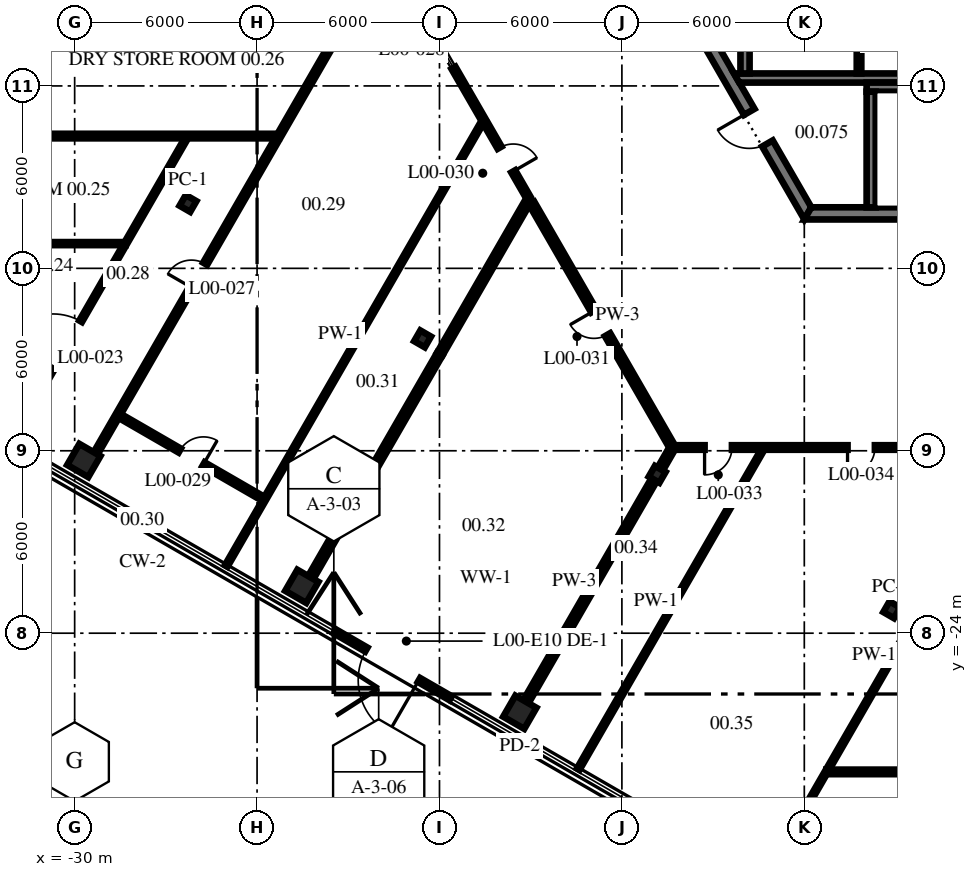
"""IFC4 building model, lengths in metres.
Left out: names, types, materials, properties, quantities, classifications, styles, units other than length and angle.
Written with IfcOpenShell. Run it as: python <this file> out.ifc"""

import sys

from ifc_helpers import new_model, si_unit, direction, frame, frame_2d, origin, origin_2d, place, context, subcontext, project, spatial, polyline, rectangle, i_section, outline, extrude, source, transform, mapped, element, fill, save


model = new_model("IFC4")
c1 = context("Model", 3, precision=1e-05, world=origin(), true_north=direction((0.0, 1.0)))
c2 = subcontext(c1, "Body", "Model", "MODEL_VIEW")
j1 = project(units=[si_unit("LENGTHUNIT", "METRE"), si_unit("PLANEANGLEUNIT", "RADIAN")], contexts=[c1])
p1 = place(None, origin())
s1 = spatial("IfcSite", under=j1, at=p1, CompositionType="ELEMENT")
p2 = place(p1, origin())
s2 = spatial("IfcBuilding", under=s1, at=p2, CompositionType="ELEMENT")
p3 = place(p2, origin())
s3 = spatial("IfcBuildingStorey", under=s2, at=p3, CompositionType="ELEMENT", Elevation=0.0)
m1 = source(origin(), c2, "Body", "SweptSolid", [
    extrude(i_section(OverallWidth=0.404, OverallDepth=0.406, WebThickness=0.027, FlangeThickness=0.044, at=origin_2d()), origin(), (0.0, 0.0, 1.0), 7.2),
])
for number, where, z_axis, x_axis in (
    (1, (-26.272, -9.865, -0.2), (0.0, 0.0, 1.0), (0.866, -0.5, 0.0)),
    (2, (-18.556, -14.32, -0.2), (0.0, 0.0, 1.0), (0.866, -0.5, 0.0)),
    (3, (-10.84, -18.775, -0.2), (0.0, 0.0, 1.0), (0.866, -0.5, 0.0)),
    (4, (-3.124, -23.23, -0.2), (0.0, 0.0, 1.0), (0.866, -0.5, 0.0)),
):
    element("IfcColumn", number, at=place(p3, frame(where, z_axis=z_axis, x_axis=x_axis)), inside=s3, PredefinedType="COLUMN", context=c2, shape_type="MappedRepresentation", body=[
        mapped(m1, transform((0.0, 0.0, 0.0), scale=1.0)),
    ])
m2 = source(origin(), c2, "Body", "SweptSolid", [
    extrude(rectangle(XDim=0.8, YDim=0.8, at=origin_2d()), origin(), (0.0, 0.0, 1.0), 7.2),
])
for number, where, z_axis, x_axis in (
    (5, (-29.699, -18.32, -0.2), (0.0, 0.0, 1.0), (0.866, -0.5, 0.0)),
    (6, (-22.528, -22.46, -0.2), (0.0, 0.0, 1.0), (0.866, -0.5, 0.0)),
    (7, (-15.358, -26.6, -0.2), (0.0, 0.0, 1.0), (0.866, -0.5, 0.0)),
):
    element("IfcColumn", number, at=place(p3, frame(where, z_axis=z_axis, x_axis=x_axis)), inside=s3, PredefinedType="COLUMN", context=c2, shape_type="MappedRepresentation", body=[
        mapped(m2, transform((0.0, 0.0, 0.0), scale=1.0)),
    ])
m3 = source(origin(), c2, "Body", "SweptSolid", [
    extrude(outline(polyline([(-0.115, -0.2), (11.885, -0.2), (11.654, 0.2), (0.115, 0.2), (-0.115, -0.2)])), origin(), (0.0, 0.0, 1.0), 7.0),
])
p4 = place(p3, frame((-11.769, 0.0, -0.2), z_axis=(0.0, 0.0, 1.0), x_axis=(0.499996592174, -0.866027371285, 0.0)))
e8 = element("IfcWall", 8, at=p4, inside=s3, PredefinedType="SHEAR", context=c2, shape_type="MappedRepresentation", body=[
    mapped(m3, transform((0.0, 0.0, 0.0), scale=1.0)),
])
p5 = place(p4, frame((1.405, 0.0, 0.2)))
e9 = element("IfcOpeningElement", 9, at=p5, cuts=e8, PredefinedType="OPENING", context=c2, shape_type="SweptSolid", body=[
    extrude(rectangle(XDim=1.8, YDim=2.1, at=frame_2d((0.9, 1.05))), frame((0.0, 0.21, 0.0), z_axis=(0.0, -1.0, 0.0), x_axis=(1.0, 0.0, 0.0)), (0.0, 0.0, 1.0), 0.42),
])
p6 = place(p4, frame((7.915, 0.0, 0.2)))
e10 = element("IfcOpeningElement", 10, at=p6, cuts=e8, PredefinedType="OPENING", context=c2, shape_type="SweptSolid", body=[
    extrude(rectangle(XDim=1.2, YDim=2.1, at=frame_2d((0.6, 1.05))), frame((0.0, 0.21, 0.0), z_axis=(0.0, -1.0, 0.0), x_axis=(1.0, 0.0, 0.0)), (0.0, 0.0, 1.0), 0.42),
])
p7 = place(p3, frame((-5.885, -10.192, -0.2), z_axis=(0.0, 0.0, 1.0), x_axis=(1.0, 0.0, 0.0)))
e11 = element("IfcWall", 11, at=p7, inside=s3, PredefinedType="SHEAR", context=c2, shape_type="MappedRepresentation", body=[
    mapped(m3, transform((0.0, 0.0, 0.0), scale=1.0)),
])
p8 = place(p7, frame((7.985, 0.0, 0.2)))
e12 = element("IfcOpeningElement", 12, at=p8, cuts=e11, PredefinedType="OPENING", context=c2, shape_type="SweptSolid", body=[
    extrude(rectangle(XDim=1.2, YDim=2.1, at=frame_2d((0.6, 1.05))), frame((0.0, 0.21, 0.0), z_axis=(0.0, -1.0, 0.0), x_axis=(1.0, 0.0, 0.0)), (0.0, 0.0, 1.0), 0.42),
])
p9 = place(p3, frame((-8.1, -5.74, -0.2), z_axis=(0.0, 0.0, 1.0), x_axis=(1.0, 0.0, 0.0)))
e13 = element("IfcWall", 13, at=p9, inside=s3, PredefinedType="SHEAR", context=c2, shape_type="SweptSolid", body=[
    extrude(outline(polyline([(12.0, -0.15), (-0.04, -0.15), (-0.213, 0.15), (12.0, 0.15), (12.0, -0.15)])), origin(), (0.0, 0.0, 1.0), 7.0),
])
m4 = source(origin(), c2, "Body", "SweptSolid", [
    extrude(rectangle(XDim=2.2, YDim=0.3, at=frame_2d((1.1, 0.0))), origin(), (0.0, 0.0, 1.0), 7.0),
])
p10 = place(p3, frame((-7.95, -5.59, -0.2), z_axis=(0.0, 0.0, 1.0), x_axis=(0.0, 1.0, 0.0)))
e14 = element("IfcWall", 14, at=p10, inside=s3, PredefinedType="SHEAR", context=c2, shape_type="MappedRepresentation", body=[
    mapped(m4, transform((0.0, 0.0, 0.0), scale=1.0)),
])
p11 = place(p3, frame((-3.95, -6.04, -0.2), z_axis=(0.0, 0.0, 1.0), x_axis=(1.0, 0.0, 0.0)))
e15 = element("IfcWall", 15, at=p11, inside=s3, PredefinedType="SHEAR", context=c2, shape_type="SweptSolid", body=[
    extrude(outline(polyline([(0.0, -0.15), (8.95, -0.15), (8.65, 0.15), (0.0, 0.15), (0.0, -0.15)])), origin(), (0.0, 0.0, 1.0), 7.0),
])
m5 = source(origin(), c2, "Body", "SweptSolid", [
    extrude(outline(polyline([(3.8, -0.15), (-0.004, -0.15), (-0.004, 0.15), (3.8, 0.15), (3.8, -0.15)])), origin(), (0.0, 0.0, 1.0), 7.0),
])
p12 = place(p3, frame((-3.8, -9.99, -0.2), z_axis=(0.0, 0.0, 1.0), x_axis=(0.0, 1.0, 0.0)))
e16 = element("IfcWall", 16, at=p12, inside=s3, PredefinedType="SHEAR", context=c2, shape_type="MappedRepresentation", body=[
    mapped(m5, transform((0.0, 0.0, 0.0), scale=1.0)),
])
m6 = source(origin(), c2, "Body", "SweptSolid", [
    extrude(rectangle(XDim=2.2, YDim=0.15, at=frame_2d((1.1, 0.0))), origin(), (0.0, 0.0, 1.0), 6.8),
])
p13 = place(p3, frame((-4.2, -5.59, 0.0), z_axis=(0.0, 0.0, 1.0), x_axis=(0.0, 1.0, 0.0)))
e17 = element("IfcWall", 17, at=p13, inside=s3, PredefinedType="PARTITIONING", context=c2, shape_type="MappedRepresentation", body=[
    mapped(m6, transform((0.0, 0.0, 0.0), scale=1.0)),
])
m7 = source(origin(), c2, "Body", "SweptSolid", [
    extrude(rectangle(XDim=4.403, YDim=0.15, at=frame_2d((2.201, 0.0))), origin(), (0.0, 0.0, 1.0), 6.8),
])
p14 = place(p3, frame((-17.634, -26.139, 0.0), z_axis=(0.0, 0.0, 1.0), x_axis=(-0.866026760492, 0.499997650106, 0.0)))
e18 = element("IfcWall", 18, at=p14, inside=s3, PredefinedType="ELEMENTEDWALL", context=c2, shape_type="MappedRepresentation", body=[
    mapped(m7, transform((0.0, 0.0, 0.0), scale=1.0)),
])
p15 = place(p14, frame((1.201, 0.0, 0.0)))
e19 = element("IfcOpeningElement", 19, at=p15, cuts=e18, PredefinedType="OPENING", context=c2, shape_type="SweptSolid", body=[
    extrude(rectangle(XDim=2.0, YDim=2.7, at=frame_2d((1.0, 1.35))), frame((0.0, 0.085, 0.0), z_axis=(0.0, -1.0, 0.0), x_axis=(1.0, 0.0, 0.0)), (0.0, 0.0, 1.0), 0.17),
])
p16 = place(p3, frame((-20.635, -0.043, 0.0), z_axis=(0.0, 0.0, 1.0), x_axis=(0.500007080889, -0.866021315593, 0.0)))
e20 = element("IfcWall", 20, at=p16, inside=s3, PredefinedType="PARTITIONING", context=c2, shape_type="SweptSolid", body=[
    extrude(rectangle(XDim=11.113, YDim=0.15, at=frame_2d((5.556, 0.0))), origin(), (0.0, 0.0, 1.0), 6.8),
])
p17 = place(p16, frame((0.4, 0.0, 0.0)))
e21 = element("IfcOpeningElement", 21, at=p17, cuts=e20, PredefinedType="OPENING", context=c2, shape_type="SweptSolid", body=[
    extrude(rectangle(XDim=0.9, YDim=2.1, at=frame_2d((0.45, 1.05))), frame((0.0, 0.085, 0.0), z_axis=(0.0, -1.0, 0.0), x_axis=(1.0, 0.0, 0.0)), (0.0, 0.0, 1.0), 0.17),
])
p18 = place(p16, frame((3.792, 0.0, 0.0)))
e22 = element("IfcOpeningElement", 22, at=p18, cuts=e20, PredefinedType="OPENING", context=c2, shape_type="SweptSolid", body=[
    extrude(rectangle(XDim=2.4, YDim=2.4, at=frame_2d((1.2, 1.2))), frame((0.0, 0.085, 0.0), z_axis=(0.0, -1.0, 0.0), x_axis=(1.0, 0.0, 0.0)), (0.0, 0.0, 1.0), 0.17),
])
p19 = place(p16, frame((9.224, 0.0, 0.0)))
e23 = element("IfcOpeningElement", 23, at=p19, cuts=e20, PredefinedType="OPENING", context=c2, shape_type="SweptSolid", body=[
    extrude(rectangle(XDim=0.9, YDim=2.1, at=frame_2d((0.45, 1.05))), frame((0.0, 0.085, 0.0), z_axis=(0.0, -1.0, 0.0), x_axis=(1.0, 0.0, 0.0)), (0.0, 0.0, 1.0), 0.17),
])
p20 = place(p3, frame((-14.969, -9.858, 0.0), z_axis=(0.0, 0.0, 1.0), x_axis=(0.500003393015, -0.866023444818, 0.0)))
e24 = element("IfcWall", 24, at=p20, inside=s3, PredefinedType="PARTITIONING", context=c2, shape_type="SweptSolid", body=[
    extrude(rectangle(XDim=9.228, YDim=0.2, at=frame_2d((4.614, 0.0))), origin(), (0.0, 0.0, 1.0), 6.8),
])
p21 = place(p20, frame((4.094, 0.0, 0.0)))
e25 = element("IfcOpeningElement", 25, at=p21, cuts=e24, PredefinedType="OPENING", context=c2, shape_type="SweptSolid", body=[
    extrude(rectangle(XDim=0.9, YDim=2.1, at=frame_2d((0.45, 1.05))), frame((0.0, 0.11, 0.0), z_axis=(0.0, -1.0, 0.0), x_axis=(1.0, 0.0, 0.0)), (0.0, 0.0, 1.0), 0.22),
])
p22 = place(p3, frame((-28.526, -16.848, 0.0), z_axis=(0.0, 0.0, 1.0), x_axis=(0.866016423889, -0.500015553313, 0.0)))
e26 = element("IfcWall", 26, at=p22, inside=s3, PredefinedType="PARTITIONING", context=c2, shape_type="SweptSolid", body=[
    extrude(rectangle(XDim=5.48, YDim=0.15, at=frame_2d((2.74, 0.0))), origin(), (0.0, 0.0, 1.0), 6.8),
])
p23 = place(p22, frame((2.29, 0.0, 0.0)))
e27 = element("IfcOpeningElement", 27, at=p23, cuts=e26, PredefinedType="OPENING", context=c2, shape_type="SweptSolid", body=[
    extrude(rectangle(XDim=0.9, YDim=2.1, at=frame_2d((0.45, 1.05))), frame((0.0, 0.085, 0.0), z_axis=(0.0, -1.0, 0.0), x_axis=(1.0, 0.0, 0.0)), (0.0, 0.0, 1.0), 0.17),
])
p24 = place(p3, frame((-5.276, -28.562, 0.0), z_axis=(0.0, 0.0, 1.0), x_axis=(1.0, 0.0, 0.0)))
e28 = element("IfcWall", 28, at=p24, inside=s3, PredefinedType="PARTITIONING", context=c2, shape_type="SweptSolid", body=[
    extrude(rectangle(XDim=17.087, YDim=0.15, at=frame_2d((8.544, 0.0))), origin(), (0.0, 0.0, 1.0), 6.8),
])
p25 = place(p24, frame((12.212, 0.0, 0.0)))
e29 = element("IfcOpeningElement", 29, at=p25, cuts=e28, PredefinedType="OPENING", context=c2, shape_type="SweptSolid", body=[
    extrude(rectangle(XDim=1.8, YDim=2.4, at=frame_2d((0.9, 1.2))), frame((0.0, 0.085, 0.0), z_axis=(0.0, -1.0, 0.0), x_axis=(1.0, 0.0, 0.0)), (0.0, 0.0, 1.0), 0.17),
])
p26 = place(p24, frame((4.05, 0.0, 0.0)))
e30 = element("IfcOpeningElement", 30, at=p26, cuts=e28, PredefinedType="OPENING", context=c2, shape_type="SweptSolid", body=[
    extrude(rectangle(XDim=0.9, YDim=2.1, at=frame_2d((0.45, 1.05))), frame((0.0, 0.085, 0.0), z_axis=(0.0, -1.0, 0.0), x_axis=(1.0, 0.0, 0.0)), (0.0, 0.0, 1.0), 0.17),
])
p27 = place(p3, frame((-10.33, -17.892, 0.0), z_axis=(0.0, 0.0, 1.0), x_axis=(1.0, 0.0, 0.0)))
e31 = element("IfcWall", 31, at=p27, inside=s3, PredefinedType="PARTITIONING", context=c2, shape_type="SweptSolid", body=[
    extrude(rectangle(XDim=20.618, YDim=0.15, at=frame_2d((10.309, 0.0))), origin(), (0.0, 0.0, 1.0), 6.8),
])
p28 = place(p27, frame((1.05, 0.0, 0.0)))
e32 = element("IfcOpeningElement", 32, at=p28, cuts=e31, PredefinedType="OPENING", context=c2, shape_type="SweptSolid", body=[
    extrude(rectangle(XDim=0.9, YDim=2.1, at=frame_2d((0.45, 1.05))), frame((0.0, 0.085, 0.0), z_axis=(0.0, -1.0, 0.0), x_axis=(1.0, 0.0, 0.0)), (0.0, 0.0, 1.0), 0.17),
])
p29 = place(p27, frame((5.752, 0.0, 0.0)))
e33 = element("IfcOpeningElement", 33, at=p29, cuts=e31, PredefinedType="OPENING", context=c2, shape_type="SweptSolid", body=[
    extrude(rectangle(XDim=0.9, YDim=2.1, at=frame_2d((0.45, 1.05))), frame((0.0, 0.085, 0.0), z_axis=(0.0, -1.0, 0.0), x_axis=(1.0, 0.0, 0.0)), (0.0, 0.0, 1.0), 0.17),
])
p30 = place(p27, frame((14.564, 0.0, 0.0)))
e34 = element("IfcOpeningElement", 34, at=p30, cuts=e31, PredefinedType="OPENING", context=c2, shape_type="SweptSolid", body=[
    extrude(rectangle(XDim=0.9, YDim=2.1, at=frame_2d((0.45, 1.05))), frame((0.0, 0.085, 0.0), z_axis=(0.0, -1.0, 0.0), x_axis=(1.0, 0.0, 0.0)), (0.0, 0.0, 1.0), 0.17),
])
p31 = place(p3, frame((-43.433, -11.186, 0.0), z_axis=(0.0, 0.0, 1.0), x_axis=(1.0, 0.0, 0.0)))
e35 = element("IfcWall", 35, at=p31, inside=s3, PredefinedType="PARTITIONING", context=c2, shape_type="SweptSolid", body=[
    extrude(rectangle(XDim=15.104, YDim=0.1, at=frame_2d((7.552, 0.0))), origin(), (0.0, 0.0, 1.0), 6.8),
])
p32 = place(p3, frame((-49.56, -7.649, 0.0), z_axis=(0.0, 0.0, 1.0), x_axis=(1.0, 0.0, 0.0)))
e36 = element("IfcWall", 36, at=p32, inside=s3, PredefinedType="PARTITIONING", context=c2, shape_type="SweptSolid", body=[
    extrude(rectangle(XDim=26.276, YDim=0.15, at=frame_2d((13.138, 0.0))), origin(), (0.0, 0.0, 1.0), 6.8),
])
p33 = place(p32, frame((11.15, 0.0, 0.0)))
e37 = element("IfcOpeningElement", 37, at=p33, cuts=e36, PredefinedType="OPENING", context=c2, shape_type="SweptSolid", body=[
    extrude(rectangle(XDim=0.9, YDim=2.1, at=frame_2d((0.45, 1.05))), frame((0.0, 0.085, 0.0), z_axis=(0.0, -1.0, 0.0), x_axis=(1.0, 0.0, 0.0)), (0.0, 0.0, 1.0), 0.17),
])
p34 = place(p3, frame((-7.279, -32.031, 0.0), z_axis=(0.0, 0.0, 1.0), x_axis=(0.499989721496, 0.866031338, 0.0)))
e38 = element("IfcWall", 38, at=p34, inside=s3, PredefinedType="PARTITIONING", context=c2, shape_type="SweptSolid", body=[
    extrude(rectangle(XDim=16.236, YDim=0.1, at=frame_2d((8.118, 0.0))), origin(), (0.0, 0.0, 1.0), 6.8),
])
p35 = place(p3, frame((-13.438, -28.475, 0.0), z_axis=(0.0, 0.0, 1.0), x_axis=(0.50000294753, 0.86602370202, 0.0)))
e39 = element("IfcWall", 39, at=p35, inside=s3, PredefinedType="PARTITIONING", context=c2, shape_type="SweptSolid", body=[
    extrude(rectangle(XDim=12.13, YDim=0.1, at=frame_2d((6.065, 0.0))), origin(), (0.0, 0.0, 1.0), 6.8),
])
p36 = place(p3, frame((-15.162, -26.263, 0.0), z_axis=(0.0, 0.0, 1.0), x_axis=(0.499984984754, 0.866034072667, 0.0)))
e40 = element("IfcWall", 40, at=p36, inside=s3, PredefinedType="PARTITIONING", context=c2, shape_type="SweptSolid", body=[
    extrude(rectangle(XDim=8.452, YDim=0.2, at=frame_2d((4.226, 0.0))), origin(), (0.0, 0.0, 1.0), 6.028),
])
p37 = place(p3, frame((-10.743, -18.608, 0.0), z_axis=(0.0, 0.0, 1.0), x_axis=(0.500080938595, 0.865978668822, 0.0)))
e41 = element("IfcWall", 41, at=p37, inside=s3, PredefinedType="PARTITIONING", context=c2, shape_type="SweptSolid", body=[
    extrude(rectangle(XDim=0.786, YDim=0.2, at=frame_2d((0.393, 0.0))), origin(), (0.0, 0.0, 1.0), 6.188),
])
p38 = place(p3, frame((-22.238, -22.177, 0.0), z_axis=(0.0, 0.0, 1.0), x_axis=(0.500007862672, 0.866020864221, 0.0)))
e42 = element("IfcWall", 42, at=p38, inside=s3, PredefinedType="PARTITIONING", context=c2, shape_type="SweptSolid", body=[
    extrude(rectangle(XDim=8.49, YDim=0.2, at=frame_2d((4.245, 0.0))), origin(), (0.0, 0.0, 1.0), 6.028),
])
p39 = place(p3, frame((-17.993, -14.824, 0.0), z_axis=(0.0, 0.0, 1.0), x_axis=(0.500003463284, 0.866023404247, 0.0)))
e43 = element("IfcWall", 43, at=p39, inside=s3, PredefinedType="PARTITIONING", context=c2, shape_type="SweptSolid", body=[
    extrude(rectangle(XDim=5.891, YDim=0.2, at=frame_2d((2.946, 0.0))), origin(), (0.0, 0.0, 1.0), 6.8),
])
p40 = place(p3, frame((-25.017, -21.79, 0.0), z_axis=(0.0, 0.0, 1.0), x_axis=(0.499997792702, 0.866026678165, 0.0)))
e44 = element("IfcWall", 44, at=p40, inside=s3, PredefinedType="PARTITIONING", context=c2, shape_type="SweptSolid", body=[
    extrude(rectangle(XDim=16.937, YDim=0.1, at=frame_2d((8.469, 0.0))), origin(), (0.0, 0.0, 1.0), 6.8),
])
p41 = place(p3, frame((-29.313, -18.092, 0.0), z_axis=(0.0, 0.0, 1.0), x_axis=(0.499996874182, 0.866027208469, 0.0)))
e45 = element("IfcWall", 45, at=p41, inside=s3, PredefinedType="PARTITIONING", context=c2, shape_type="SweptSolid", body=[
    extrude(rectangle(XDim=19.099, YDim=0.15, at=frame_2d((9.549, 0.0))), origin(), (0.0, 0.0, 1.0), 6.8),
])
p42 = place(p41, frame((6.309, 0.0, 0.0)))
e46 = element("IfcOpeningElement", 46, at=p42, cuts=e45, PredefinedType="OPENING", context=c2, shape_type="SweptSolid", body=[
    extrude(rectangle(XDim=0.9, YDim=2.1, at=frame_2d((0.45, 1.05))), frame((0.0, 0.085, 0.0), z_axis=(0.0, -1.0, 0.0), x_axis=(1.0, 0.0, 0.0)), (0.0, 0.0, 1.0), 0.17),
])
p43 = place(p3, frame((-32.092, -17.705, 0.0), z_axis=(0.0, 0.0, 1.0), x_axis=(0.499985969581, 0.866033504099, 0.0)))
e47 = element("IfcWall", 47, at=p43, inside=s3, PredefinedType="PARTITIONING", context=c2, shape_type="SweptSolid", body=[
    extrude(rectangle(XDim=11.522, YDim=0.1, at=frame_2d((5.761, 0.0))), origin(), (0.0, 0.0, 1.0), 6.8),
])
p44 = place(p43, frame((2.777, 0.0, 0.0)))
e48 = element("IfcOpeningElement", 48, at=p44, cuts=e47, PredefinedType="OPENING", context=c2, shape_type="SweptSolid", body=[
    extrude(rectangle(XDim=1.8, YDim=2.4, at=frame_2d((0.9, 1.2))), frame((0.0, 0.06, 0.0), z_axis=(0.0, -1.0, 0.0), x_axis=(1.0, 0.0, 0.0)), (0.0, 0.0, 1.0), 0.12),
])
p45 = place(p6, frame((1.2, 0.0, 0.0), z_axis=(0.0, 0.0, 1.0), x_axis=(-1.0, 0.0, 0.0)))
e49 = element("IfcDoor", 49, at=p45, inside=s3, OperationType="SINGLE_SWING_RIGHT", PredefinedType="DOOR", context=c2, shape_type="SweptSolid", body=[
    extrude(rectangle(XDim=1.2, YDim=2.1, at=frame_2d((0.6, 1.05))), frame((0.0, 0.025, 0.0), z_axis=(0.0, -1.0, 0.0), x_axis=(1.0, 0.0, 0.0)), (0.0, 0.0, 1.0), 0.05),
])
fill(e10, e49)
p46 = place(p15, origin())
e50 = element("IfcDoor", 50, at=p46, inside=s3, OperationType="DOUBLE_DOOR_SINGLE_SWING", PredefinedType="DOOR", context=c2, shape_type="SweptSolid", body=[
    extrude(rectangle(XDim=2.0, YDim=2.7, at=frame_2d((1.0, 1.35))), frame((0.0, 0.025, 0.0), z_axis=(0.0, -1.0, 0.0), x_axis=(1.0, 0.0, 0.0)), (0.0, 0.0, 1.0), 0.05),
])
fill(e19, e50)
p47 = place(p44, origin())
e51 = element("IfcDoor", 51, at=p47, inside=s3, OperationType="DOUBLE_DOOR_SINGLE_SWING", PredefinedType="DOOR", context=c2, shape_type="SweptSolid", body=[
    extrude(rectangle(XDim=1.8, YDim=2.4, at=frame_2d((0.9, 1.2))), frame((0.0, 0.025, 0.0), z_axis=(0.0, -1.0, 0.0), x_axis=(1.0, 0.0, 0.0)), (0.0, 0.0, 1.0), 0.05),
])
fill(e48, e51)
p48 = place(p42, origin())
e52 = element("IfcDoor", 52, at=p48, inside=s3, OperationType="SINGLE_SWING_LEFT", PredefinedType="DOOR", context=c2, shape_type="SweptSolid", body=[
    extrude(rectangle(XDim=0.9, YDim=2.1, at=frame_2d((0.45, 1.05))), frame((0.0, 0.025, 0.0), z_axis=(0.0, -1.0, 0.0), x_axis=(1.0, 0.0, 0.0)), (0.0, 0.0, 1.0), 0.05),
])
fill(e46, e52)
p49 = place(p18, origin())
e53 = element("IfcDoor", 53, at=p49, inside=s3, OperationType="ROLLINGUP", PredefinedType="DOOR", context=c2, shape_type="SweptSolid", body=[
    extrude(rectangle(XDim=2.4, YDim=2.4, at=frame_2d((1.2, 1.2))), frame((0.0, 0.025, 0.0), z_axis=(0.0, -1.0, 0.0), x_axis=(1.0, 0.0, 0.0)), (0.0, 0.0, 1.0), 0.05),
])
fill(e22, e53)
p50 = place(p23, origin())
e54 = element("IfcDoor", 54, at=p50, inside=s3, OperationType="SINGLE_SWING_LEFT", PredefinedType="DOOR", context=c2, shape_type="SweptSolid", body=[
    extrude(rectangle(XDim=0.9, YDim=2.1, at=frame_2d((0.45, 1.05))), frame((0.0, 0.025, 0.0), z_axis=(0.0, -1.0, 0.0), x_axis=(1.0, 0.0, 0.0)), (0.0, 0.0, 1.0), 0.05),
])
fill(e27, e54)
p51 = place(p19, origin())
e55 = element("IfcDoor", 55, at=p51, inside=s3, OperationType="SINGLE_SWING_LEFT", PredefinedType="DOOR", context=c2, shape_type="SweptSolid", body=[
    extrude(rectangle(XDim=0.9, YDim=2.1, at=frame_2d((0.45, 1.05))), frame((0.0, 0.025, 0.0), z_axis=(0.0, -1.0, 0.0), x_axis=(1.0, 0.0, 0.0)), (0.0, 0.0, 1.0), 0.05),
])
fill(e23, e55)
p52 = place(p21, origin())
e56 = element("IfcDoor", 56, at=p52, inside=s3, OperationType="SINGLE_SWING_RIGHT", PredefinedType="DOOR", context=c2, shape_type="SweptSolid", body=[
    extrude(rectangle(XDim=0.9, YDim=2.1, at=frame_2d((0.45, 1.05))), frame((0.0, 0.025, 0.0), z_axis=(0.0, -1.0, 0.0), x_axis=(1.0, 0.0, 0.0)), (0.0, 0.0, 1.0), 0.05),
])
fill(e25, e56)
p53 = place(p28, origin())
e57 = element("IfcDoor", 57, at=p53, inside=s3, OperationType="SINGLE_SWING_RIGHT", PredefinedType="DOOR", context=c2, shape_type="SweptSolid", body=[
    extrude(rectangle(XDim=0.9, YDim=2.1, at=frame_2d((0.45, 1.05))), frame((0.0, 0.025, 0.0), z_axis=(0.0, -1.0, 0.0), x_axis=(1.0, 0.0, 0.0)), (0.0, 0.0, 1.0), 0.05),
])
fill(e32, e57)
p54 = place(p29, origin())
e58 = element("IfcDoor", 58, at=p54, inside=s3, OperationType="SINGLE_SWING_RIGHT", PredefinedType="DOOR", context=c2, shape_type="SweptSolid", body=[
    extrude(rectangle(XDim=0.9, YDim=2.1, at=frame_2d((0.45, 1.05))), frame((0.0, 0.025, 0.0), z_axis=(0.0, -1.0, 0.0), x_axis=(1.0, 0.0, 0.0)), (0.0, 0.0, 1.0), 0.05),
])
fill(e33, e58)
save(model, sys.argv[1])
